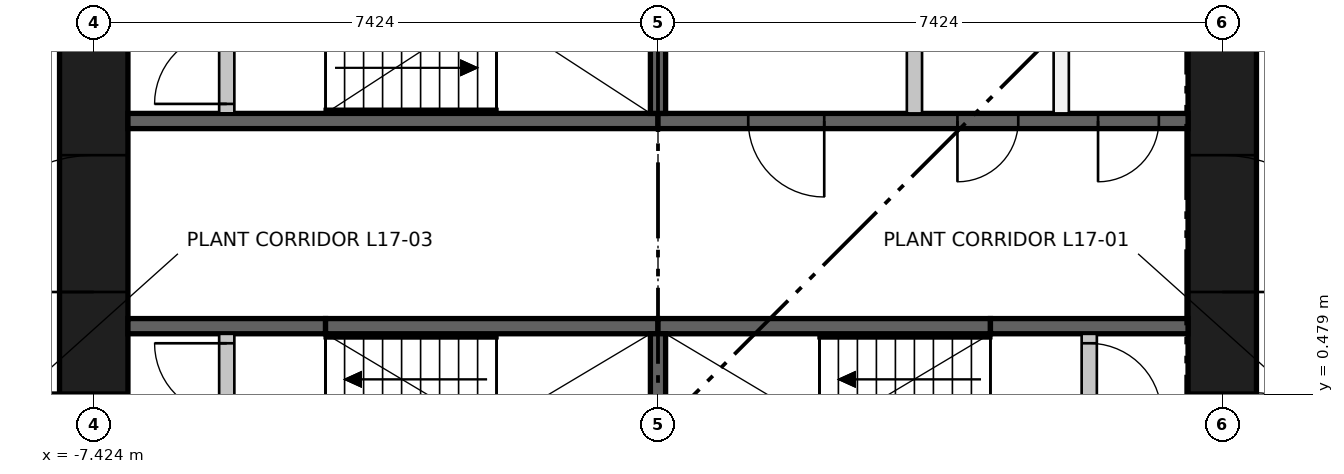
"""IFC4 building model, lengths in metres.
Left out: names, types, materials, properties, quantities, classifications, styles, units other than length and angle.
Written with IfcOpenShell. Run it as: python <this file> out.ifc"""

import sys

from ifc_helpers import new_model, si_unit, direction, frame, frame_2d, origin, place, context, subcontext, project, spatial, rectangle, extrude, element, fill, save


model = new_model("IFC4")
c1 = context("Model", 3, precision=1e-05, world=origin(), true_north=direction((0.0, 1.0)))
c2 = subcontext(c1, "Body", "Model", "MODEL_VIEW")
j1 = project(units=[si_unit("LENGTHUNIT", "METRE"), si_unit("PLANEANGLEUNIT", "RADIAN")], contexts=[c1])
p1 = place(None, origin())
s1 = spatial("IfcSite", under=j1, at=p1, CompositionType="ELEMENT")
p2 = place(p1, origin())
s2 = spatial("IfcBuilding", under=s1, at=p2, CompositionType="ELEMENT")
p3 = place(p2, frame((0.0, 0.0, 66.35)))
s3 = spatial("IfcBuildingStorey", under=s2, at=p3, CompositionType="ELEMENT", Elevation=66.35)
p4 = place(p3, frame((-7.424, -6.974, 0.0), z_axis=(0.0, 0.0, 1.0), x_axis=(0.0, 1.0, 0.0)))
e1 = element("IfcWall", 1, at=p4, inside=s3, PredefinedType="SHEAR", context=c2, shape_type="SweptSolid", body=[
    extrude(rectangle(XDim=13.948, YDim=0.9, at=frame_2d((6.974, 0.0))), origin(), (0.0, 0.0, 1.0), 6.4),
])
p5 = place(p4, frame((6.474, 0.0, 0.0)))
e2 = element("IfcOpeningElement", 2, at=p5, cuts=e1, PredefinedType="OPENING", context=c2, shape_type="SweptSolid", body=[
    extrude(rectangle(XDim=1.0, YDim=2.1, at=frame_2d((0.5, 1.05))), frame((0.0, 0.46, 0.0), z_axis=(0.0, -1.0, 0.0), x_axis=(1.0, 0.0, 0.0)), (0.0, 0.0, 1.0), 0.92),
])
p6 = place(p4, frame((3.35, 0.0, 0.0)))
e3 = element("IfcOpeningElement", 3, at=p6, cuts=e1, PredefinedType="OPENING", context=c2, shape_type="SweptSolid", body=[
    extrude(rectangle(XDim=1.8, YDim=2.1, at=frame_2d((0.9, 1.05))), frame((0.0, 0.46, 0.0), z_axis=(0.0, -1.0, 0.0), x_axis=(1.0, 0.0, 0.0)), (0.0, 0.0, 1.0), 0.92),
])
p7 = place(p4, frame((8.799, 0.0, 0.0)))
e4 = element("IfcOpeningElement", 4, at=p7, cuts=e1, PredefinedType="OPENING", context=c2, shape_type="SweptSolid", body=[
    extrude(rectangle(XDim=1.8, YDim=2.1, at=frame_2d((0.9, 1.05))), frame((0.0, 0.46, 0.0), z_axis=(0.0, -1.0, 0.0), x_axis=(1.0, 0.0, 0.0)), (0.0, 0.0, 1.0), 0.92),
])
p8 = place(p4, frame((11.974, 0.0, 0.0)))
e5 = element("IfcOpeningElement", 5, at=p8, cuts=e1, PredefinedType="OPENING", context=c2, shape_type="SweptSolid", body=[
    extrude(rectangle(XDim=1.0, YDim=2.1, at=frame_2d((0.5, 1.05))), frame((0.0, 0.46, 0.0), z_axis=(0.0, -1.0, 0.0), x_axis=(1.0, 0.0, 0.0)), (0.0, 0.0, 1.0), 0.92),
])
p9 = place(p3, frame((7.424, -6.974, 0.0), z_axis=(0.0, 0.0, 1.0), x_axis=(0.0, 1.0, 0.0)))
e6 = element("IfcWall", 6, at=p9, inside=s3, PredefinedType="SHEAR", context=c2, shape_type="SweptSolid", body=[
    extrude(rectangle(XDim=13.948, YDim=0.9, at=frame_2d((6.974, 0.0))), origin(), (0.0, 0.0, 1.0), 6.4),
])
p10 = place(p9, frame((6.474, 0.0, 0.0)))
e7 = element("IfcOpeningElement", 7, at=p10, cuts=e6, PredefinedType="OPENING", context=c2, shape_type="SweptSolid", body=[
    extrude(rectangle(XDim=1.0, YDim=2.1, at=frame_2d((0.5, 1.05))), frame((0.0, 0.46, 0.0), z_axis=(0.0, -1.0, 0.0), x_axis=(1.0, 0.0, 0.0)), (0.0, 0.0, 1.0), 0.92),
])
p11 = place(p9, frame((3.35, 0.0, 0.0)))
e8 = element("IfcOpeningElement", 8, at=p11, cuts=e6, PredefinedType="OPENING", context=c2, shape_type="SweptSolid", body=[
    extrude(rectangle(XDim=1.8, YDim=2.1, at=frame_2d((0.9, 1.05))), frame((0.0, 0.46, 0.0), z_axis=(0.0, -1.0, 0.0), x_axis=(1.0, 0.0, 0.0)), (0.0, 0.0, 1.0), 0.92),
])
p12 = place(p9, frame((8.799, 0.0, 0.0)))
e9 = element("IfcOpeningElement", 9, at=p12, cuts=e6, PredefinedType="OPENING", context=c2, shape_type="SweptSolid", body=[
    extrude(rectangle(XDim=1.8, YDim=2.1, at=frame_2d((0.9, 1.05))), frame((0.0, 0.46, 0.0), z_axis=(0.0, -1.0, 0.0), x_axis=(1.0, 0.0, 0.0)), (0.0, 0.0, 1.0), 0.92),
])
p13 = place(p3, frame((-6.974, 4.074, 0.0), z_axis=(0.0, 0.0, 1.0), x_axis=(1.0, 0.0, 0.0)))
e10 = element("IfcWall", 10, at=p13, inside=s3, PredefinedType="SHEAR", context=c2, shape_type="SweptSolid", body=[
    extrude(rectangle(XDim=6.974, YDim=0.2, at=frame_2d((3.487, 0.0))), origin(), (0.0, 0.0, 1.0), 6.05),
])
p14 = place(p3, frame((0.0, 4.074, 0.0), z_axis=(0.0, 0.0, 1.0), x_axis=(1.0, 0.0, 0.0)))
e11 = element("IfcWall", 11, at=p14, inside=s3, PredefinedType="SHEAR", context=c2, shape_type="SweptSolid", body=[
    extrude(rectangle(XDim=6.974, YDim=0.2, at=frame_2d((3.487, 0.0))), origin(), (0.0, 0.0, 1.0), 6.05),
])
p15 = place(p14, frame((1.187, 0.0, 0.0)))
e12 = element("IfcOpeningElement", 12, at=p15, cuts=e11, PredefinedType="OPENING", context=c2, shape_type="SweptSolid", body=[
    extrude(rectangle(XDim=1.0, YDim=2.1, at=frame_2d((0.5, 1.05))), frame((0.0, 0.11, 0.0), z_axis=(0.0, -1.0, 0.0), x_axis=(1.0, 0.0, 0.0)), (0.0, 0.0, 1.0), 0.22),
])
p16 = place(p14, frame((3.94, 0.0, 0.0)))
e13 = element("IfcOpeningElement", 13, at=p16, cuts=e11, PredefinedType="OPENING", context=c2, shape_type="SweptSolid", body=[
    extrude(rectangle(XDim=0.8, YDim=2.1, at=frame_2d((0.4, 1.05))), frame((0.0, 0.11, 0.0), z_axis=(0.0, -1.0, 0.0), x_axis=(1.0, 0.0, 0.0)), (0.0, 0.0, 1.0), 0.22),
])
p17 = place(p14, frame((5.79, 0.0, 0.0)))
e14 = element("IfcOpeningElement", 14, at=p17, cuts=e11, PredefinedType="OPENING", context=c2, shape_type="SweptSolid", body=[
    extrude(rectangle(XDim=0.8, YDim=2.1, at=frame_2d((0.4, 1.05))), frame((0.0, 0.11, 0.0), z_axis=(0.0, -1.0, 0.0), x_axis=(1.0, 0.0, 0.0)), (0.0, 0.0, 1.0), 0.22),
])
p18 = place(p3, frame((-6.974, 1.375, 0.0), z_axis=(0.0, 0.0, 1.0), x_axis=(1.0, 0.0, 0.0)))
e15 = element("IfcWall", 15, at=p18, inside=s3, PredefinedType="SHEAR", context=c2, shape_type="SweptSolid", body=[
    extrude(rectangle(XDim=2.6, YDim=0.2, at=frame_2d((1.3, 0.0))), origin(), (0.0, 0.0, 1.0), 6.05),
])
for number, where, z_axis, x_axis in (
    (16, (-4.374, 1.375, 0.0), (0.0, 0.0, 1.0), (1.0, 0.0, 0.0)),
    (17, (0.0, 1.375, 0.0), (0.0, 0.0, 1.0), (1.0, 0.0, 0.0)),
):
    element("IfcWall", number, at=place(p3, frame(where, z_axis=z_axis, x_axis=x_axis)), inside=s3, PredefinedType="SHEAR", context=c2, shape_type="SweptSolid", body=[
        extrude(rectangle(XDim=4.374, YDim=0.2, at=frame_2d((2.187, 0.0))), origin(), (0.0, 0.0, 1.0), 6.05),
    ])
p19 = place(p3, frame((4.374, 1.375, 0.0), z_axis=(0.0, 0.0, 1.0), x_axis=(1.0, 0.0, 0.0)))
e18 = element("IfcWall", 18, at=p19, inside=s3, PredefinedType="SHEAR", context=c2, shape_type="SweptSolid", body=[
    extrude(rectangle(XDim=2.6, YDim=0.2, at=frame_2d((1.3, 0.0))), origin(), (0.0, 0.0, 1.0), 6.05),
])
p20 = place(p3, frame((0.0, -1.275, 0.0), z_axis=(0.0, 0.0, 1.0), x_axis=(0.0, 1.0, 0.0)))
e19 = element("IfcWall", 19, at=p20, inside=s3, PredefinedType="SHEAR", context=c2, shape_type="SweptSolid", body=[
    extrude(rectangle(XDim=2.55, YDim=0.2, at=frame_2d((1.275, 0.0))), origin(), (0.0, 0.0, 1.0), 6.05),
])
p21 = place(p3, frame((0.0, 4.174, 0.0), z_axis=(0.0, 0.0, 1.0), x_axis=(0.0, 1.0, 0.0)))
e20 = element("IfcWall", 20, at=p21, inside=s3, PredefinedType="SHEAR", context=c2, shape_type="SweptSolid", body=[
    extrude(rectangle(XDim=1.4, YDim=0.2, at=frame_2d((0.7, 0.0))), origin(), (0.0, 0.0, 1.0), 6.05),
])
for number, where, z_axis, x_axis in (
    (21, (3.374, 4.174, 0.0), (0.0, 0.0, 1.0), (0.0, 1.0, 0.0)),
    (22, (5.305, 4.174, 0.0), (0.0, 0.0, 1.0), (0.0, 1.0, 0.0)),
):
    element("IfcWall", number, at=place(p3, frame(where, z_axis=z_axis, x_axis=x_axis)), inside=s3, PredefinedType="PARTITIONING", context=c2, shape_type="SweptSolid", body=[
        extrude(rectangle(XDim=2.8, YDim=0.2, at=frame_2d((1.4, 0.0))), origin(), (0.0, 0.0, 1.0), 6.05),
    ])
p22 = place(p3, frame((-5.674, -1.275, 0.0), z_axis=(0.0, 0.0, 1.0), x_axis=(0.0, 1.0, 0.0)))
e23 = element("IfcWall", 23, at=p22, inside=s3, PredefinedType="PARTITIONING", context=c2, shape_type="SweptSolid", body=[
    extrude(rectangle(XDim=2.55, YDim=0.2, at=frame_2d((1.275, 0.0))), origin(), (0.0, 0.0, 1.0), 6.05),
])
p23 = place(p22, frame((0.125, 0.0, 0.0)))
e24 = element("IfcOpeningElement", 24, at=p23, cuts=e23, PredefinedType="OPENING", context=c2, shape_type="SweptSolid", body=[
    extrude(rectangle(XDim=0.95, YDim=2.1, at=frame_2d((0.475, 1.05))), frame((0.0, 0.11, 0.0), z_axis=(0.0, -1.0, 0.0), x_axis=(1.0, 0.0, 0.0)), (0.0, 0.0, 1.0), 0.22),
])
p24 = place(p22, frame((1.475, 0.0, 0.0)))
e25 = element("IfcOpeningElement", 25, at=p24, cuts=e23, PredefinedType="OPENING", context=c2, shape_type="SweptSolid", body=[
    extrude(rectangle(XDim=0.95, YDim=2.1, at=frame_2d((0.475, 1.05))), frame((0.0, 0.11, 0.0), z_axis=(0.0, -1.0, 0.0), x_axis=(1.0, 0.0, 0.0)), (0.0, 0.0, 1.0), 0.22),
])
p25 = place(p3, frame((5.674, -1.275, 0.0), z_axis=(0.0, 0.0, 1.0), x_axis=(0.0, 1.0, 0.0)))
e26 = element("IfcWall", 26, at=p25, inside=s3, PredefinedType="PARTITIONING", context=c2, shape_type="SweptSolid", body=[
    extrude(rectangle(XDim=2.55, YDim=0.2, at=frame_2d((1.275, 0.0))), origin(), (0.0, 0.0, 1.0), 6.05),
])
p26 = place(p25, frame((0.125, 0.0, 0.0)))
e27 = element("IfcOpeningElement", 27, at=p26, cuts=e26, PredefinedType="OPENING", context=c2, shape_type="SweptSolid", body=[
    extrude(rectangle(XDim=0.95, YDim=2.1, at=frame_2d((0.475, 1.05))), frame((0.0, 0.11, 0.0), z_axis=(0.0, -1.0, 0.0), x_axis=(1.0, 0.0, 0.0)), (0.0, 0.0, 1.0), 0.22),
])
p27 = place(p25, frame((1.475, 0.0, 0.0)))
e28 = element("IfcOpeningElement", 28, at=p27, cuts=e26, PredefinedType="OPENING", context=c2, shape_type="SweptSolid", body=[
    extrude(rectangle(XDim=0.95, YDim=2.1, at=frame_2d((0.475, 1.05))), frame((0.0, 0.11, 0.0), z_axis=(0.0, -1.0, 0.0), x_axis=(1.0, 0.0, 0.0)), (0.0, 0.0, 1.0), 0.22),
])
p28 = place(p3, frame((-5.674, 4.174, 0.0), z_axis=(0.0, 0.0, 1.0), x_axis=(0.0, 1.0, 0.0)))
e29 = element("IfcWall", 29, at=p28, inside=s3, PredefinedType="PARTITIONING", context=c2, shape_type="SweptSolid", body=[
    extrude(rectangle(XDim=2.8, YDim=0.2, at=frame_2d((1.4, 0.0))), origin(), (0.0, 0.0, 1.0), 6.05),
])
p29 = place(p28, frame((0.125, 0.0, 0.0)))
e30 = element("IfcOpeningElement", 30, at=p29, cuts=e29, PredefinedType="OPENING", context=c2, shape_type="SweptSolid", body=[
    extrude(rectangle(XDim=0.95, YDim=2.1, at=frame_2d((0.475, 1.05))), frame((0.0, 0.11, 0.0), z_axis=(0.0, -1.0, 0.0), x_axis=(1.0, 0.0, 0.0)), (0.0, 0.0, 1.0), 0.22),
])
p30 = place(p28, frame((1.725, 0.0, 0.0)))
e31 = element("IfcOpeningElement", 31, at=p30, cuts=e29, PredefinedType="OPENING", context=c2, shape_type="SweptSolid", body=[
    extrude(rectangle(XDim=0.95, YDim=2.1, at=frame_2d((0.475, 1.05))), frame((0.0, 0.11, 0.0), z_axis=(0.0, -1.0, 0.0), x_axis=(1.0, 0.0, 0.0)), (0.0, 0.0, 1.0), 0.22),
])
p31 = place(p24, origin())
e32 = element("IfcDoor", 32, at=p31, inside=s3, OperationType="SINGLE_SWING_RIGHT", PredefinedType="DOOR", context=c2, shape_type="SweptSolid", body=[
    extrude(rectangle(XDim=0.95, YDim=2.1, at=frame_2d((0.475, 1.05))), frame((0.0, 0.025, 0.0), z_axis=(0.0, -1.0, 0.0), x_axis=(1.0, 0.0, 0.0)), (0.0, 0.0, 1.0), 0.05),
])
fill(e25, e32)
p32 = place(p27, frame((0.95, 0.0, 0.0), z_axis=(0.0, 0.0, 1.0), x_axis=(-1.0, 0.0, 0.0)))
e33 = element("IfcDoor", 33, at=p32, inside=s3, OperationType="SINGLE_SWING_LEFT", PredefinedType="DOOR", context=c2, shape_type="SweptSolid", body=[
    extrude(rectangle(XDim=0.95, YDim=2.1, at=frame_2d((0.475, 1.05))), frame((0.0, 0.025, 0.0), z_axis=(0.0, -1.0, 0.0), x_axis=(1.0, 0.0, 0.0)), (0.0, 0.0, 1.0), 0.05),
])
fill(e28, e33)
p33 = place(p29, origin())
e34 = element("IfcDoor", 34, at=p33, inside=s3, OperationType="SINGLE_SWING_LEFT", PredefinedType="DOOR", context=c2, shape_type="SweptSolid", body=[
    extrude(rectangle(XDim=0.95, YDim=2.1, at=frame_2d((0.475, 1.05))), frame((0.0, 0.025, 0.0), z_axis=(0.0, -1.0, 0.0), x_axis=(1.0, 0.0, 0.0)), (0.0, 0.0, 1.0), 0.05),
])
fill(e30, e34)
p34 = place(p15, frame((1.0, 0.0, 0.0), z_axis=(0.0, 0.0, 1.0), x_axis=(-1.0, 0.0, 0.0)))
e35 = element("IfcDoor", 35, at=p34, inside=s3, OperationType="SINGLE_SWING_RIGHT", PredefinedType="DOOR", context=c2, shape_type="SweptSolid", body=[
    extrude(rectangle(XDim=1.0, YDim=2.1, at=frame_2d((0.5, 1.05))), frame((0.0, 0.025, 0.0), z_axis=(0.0, -1.0, 0.0), x_axis=(1.0, 0.0, 0.0)), (0.0, 0.0, 1.0), 0.05),
])
fill(e12, e35)
p35 = place(p16, frame((0.8, 0.0, 0.0), z_axis=(0.0, 0.0, 1.0), x_axis=(-1.0, 0.0, 0.0)))
e36 = element("IfcDoor", 36, at=p35, inside=s3, OperationType="SINGLE_SWING_LEFT", PredefinedType="DOOR", context=c2, shape_type="SweptSolid", body=[
    extrude(rectangle(XDim=0.8, YDim=2.1, at=frame_2d((0.4, 1.05))), frame((0.0, 0.025, 0.0), z_axis=(0.0, -1.0, 0.0), x_axis=(1.0, 0.0, 0.0)), (0.0, 0.0, 1.0), 0.05),
])
fill(e13, e36)
p36 = place(p17, frame((0.8, 0.0, 0.0), z_axis=(0.0, 0.0, 1.0), x_axis=(-1.0, 0.0, 0.0)))
e37 = element("IfcDoor", 37, at=p36, inside=s3, OperationType="SINGLE_SWING_LEFT", PredefinedType="DOOR", context=c2, shape_type="SweptSolid", body=[
    extrude(rectangle(XDim=0.8, YDim=2.1, at=frame_2d((0.4, 1.05))), frame((0.0, 0.025, 0.0), z_axis=(0.0, -1.0, 0.0), x_axis=(1.0, 0.0, 0.0)), (0.0, 0.0, 1.0), 0.05),
])
fill(e14, e37)
p37 = place(p5, origin())
e38 = element("IfcDoor", 38, at=p37, inside=s3, OperationType="SINGLE_SWING_RIGHT", PredefinedType="DOOR", context=c2, shape_type="SweptSolid", body=[
    extrude(rectangle(XDim=1.0, YDim=2.1, at=frame_2d((0.5, 1.05))), frame((0.0, 0.45, 0.0), z_axis=(0.0, -1.0, 0.0), x_axis=(1.0, 0.0, 0.0)), (0.0, 0.0, 1.0), 0.05),
])
fill(e2, e38)
p38 = place(p7, origin())
e39 = element("IfcDoor", 39, at=p38, inside=s3, OperationType="DOUBLE_DOOR_SINGLE_SWING", PredefinedType="DOOR", context=c2, shape_type="SweptSolid", body=[
    extrude(rectangle(XDim=1.8, YDim=2.1, at=frame_2d((0.9, 1.05))), frame((0.0, 0.025, 0.0), z_axis=(0.0, -1.0, 0.0), x_axis=(1.0, 0.0, 0.0)), (0.0, 0.0, 1.0), 0.05),
])
fill(e4, e39)
p39 = place(p10, frame((1.0, 0.0, 0.0), z_axis=(0.0, 0.0, 1.0), x_axis=(-1.0, 0.0, 0.0)))
e40 = element("IfcDoor", 40, at=p39, inside=s3, OperationType="SINGLE_SWING_LEFT", PredefinedType="DOOR", context=c2, shape_type="SweptSolid", body=[
    extrude(rectangle(XDim=1.0, YDim=2.1, at=frame_2d((0.5, 1.05))), frame((0.0, 0.45, 0.0), z_axis=(0.0, -1.0, 0.0), x_axis=(1.0, 0.0, 0.0)), (0.0, 0.0, 1.0), 0.05),
])
fill(e7, e40)
p40 = place(p12, frame((1.8, 0.0, 0.0), z_axis=(0.0, 0.0, 1.0), x_axis=(-1.0, 0.0, 0.0)))
e41 = element("IfcDoor", 41, at=p40, inside=s3, OperationType="DOUBLE_DOOR_SINGLE_SWING", PredefinedType="DOOR", context=c2, shape_type="SweptSolid", body=[
    extrude(rectangle(XDim=1.8, YDim=2.1, at=frame_2d((0.9, 1.05))), frame((0.0, 0.025, 0.0), z_axis=(0.0, -1.0, 0.0), x_axis=(1.0, 0.0, 0.0)), (0.0, 0.0, 1.0), 0.05),
])
fill(e9, e41)
save(model, sys.argv[1])
